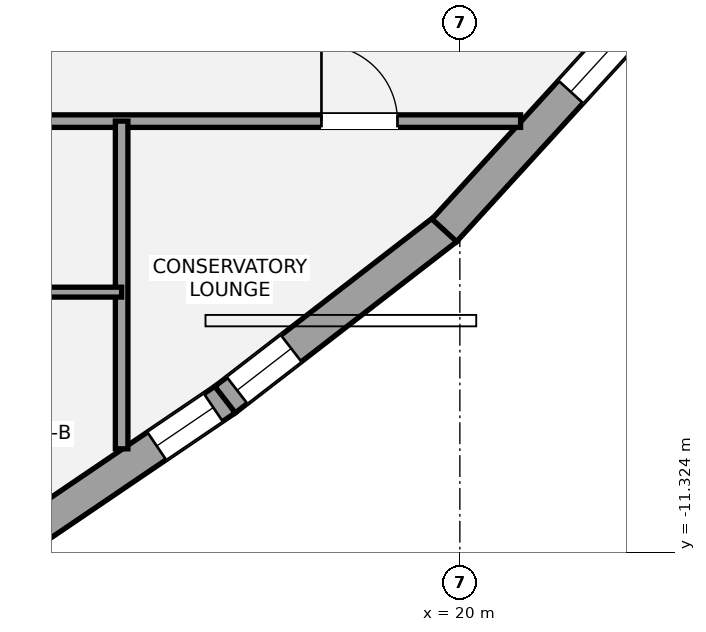
"""IFC4 building model, lengths in metres.
Left out: names, types, materials, properties, quantities, classifications, styles, units other than length and angle.
Written with IfcOpenShell. Run it as: python <this file> out.ifc"""

import sys

from ifc_helpers import new_model, si_unit, direction, frame, frame_2d, origin, place, context, subcontext, project, spatial, rectangle, extrude, element, fill, save


model = new_model("IFC4")
c1 = context("Model", 3, precision=1e-05, world=origin(), true_north=direction((0.0, 1.0)))
c2 = subcontext(c1, "Body", "Model", "MODEL_VIEW")
j1 = project(units=[si_unit("LENGTHUNIT", "METRE"), si_unit("PLANEANGLEUNIT", "RADIAN")], contexts=[c1])
p1 = place(None, origin())
s1 = spatial("IfcSite", under=j1, at=p1, CompositionType="ELEMENT")
p2 = place(p1, origin())
s2 = spatial("IfcBuilding", under=s1, at=p2, CompositionType="ELEMENT")
p3 = place(p2, frame((0.0, 0.0, 210.0)))
s3 = spatial("IfcBuildingStorey", under=s2, at=p3, CompositionType="ELEMENT", Elevation=210.0)
p4 = place(p3, frame((16.922, -9.306, 0.0), z_axis=(0.0, 0.0, 1.0), x_axis=(-0.827589832786, -0.561333295529, 0.0)))
e1 = element("IfcWall", 1, at=p4, inside=s3, PredefinedType="STANDARD", context=c2, shape_type="SweptSolid", body=[
    extrude(rectangle(XDim=3.693, YDim=0.44, at=frame_2d((1.847, 0.0))), origin(), (0.0, 0.0, 1.0), 2.336),
])
p5 = place(p4, frame((0.2, 0.0, 0.42)))
e2 = element("IfcOpeningElement", 2, at=p5, cuts=e1, PredefinedType="OPENING", context=c2, shape_type="SweptSolid", body=[
    extrude(rectangle(XDim=0.9, YDim=1.35, at=frame_2d((0.45, 0.675))), frame((0.0, 0.23, 0.0), z_axis=(0.0, -1.0, 0.0), x_axis=(1.0, 0.0, 0.0)), (0.0, 0.0, 1.0), 0.46),
])
p6 = place(p3, frame((19.823, -7.062, 0.0), z_axis=(0.0, 0.0, 1.0), x_axis=(-0.791016617957, -0.61179466336, 0.0)))
e3 = element("IfcWall", 3, at=p6, inside=s3, PredefinedType="STANDARD", context=c2, shape_type="SweptSolid", body=[
    extrude(rectangle(XDim=3.682, YDim=0.44, at=frame_2d((1.841, 0.0))), origin(), (0.0, 0.0, 1.0), 2.336),
])
p7 = place(p6, frame((2.582, 0.0, 0.42)))
e4 = element("IfcOpeningElement", 4, at=p7, cuts=e3, PredefinedType="OPENING", context=c2, shape_type="SweptSolid", body=[
    extrude(rectangle(XDim=0.9, YDim=1.35, at=frame_2d((0.45, 0.675))), frame((0.0, 0.23, 0.0), z_axis=(0.0, -1.0, 0.0), x_axis=(1.0, 0.0, 0.0)), (0.0, 0.0, 1.0), 0.46),
])
p8 = place(p3, frame((22.201, -4.453, 0.0), z_axis=(0.0, 0.0, 1.0), x_axis=(-0.674353738675, -0.738408447362, 0.0)))
e5 = element("IfcWall", 5, at=p8, inside=s3, PredefinedType="STANDARD", context=c2, shape_type="SweptSolid", body=[
    extrude(rectangle(XDim=3.568, YDim=0.44, at=frame_2d((1.784, 0.0))), origin(), (0.0, 0.0, 1.0), 2.336),
])
p9 = place(p8, frame((0.2, 0.0, 0.42)))
e6 = element("IfcOpeningElement", 6, at=p9, cuts=e5, PredefinedType="OPENING", context=c2, shape_type="SweptSolid", body=[
    extrude(rectangle(XDim=0.9, YDim=1.35, at=frame_2d((0.45, 0.675))), frame((0.0, 0.23, 0.0), z_axis=(0.0, -1.0, 0.0), x_axis=(1.0, 0.0, 0.0)), (0.0, 0.0, 1.0), 0.46),
])
p10 = place(p3, frame((-20.799, -5.65, 0.0), z_axis=(0.0, 0.0, 1.0), x_axis=(1.0, 0.0, 0.0)))
e7 = element("IfcWall", 7, at=p10, inside=s3, PredefinedType="PARTITIONING", context=c2, shape_type="SweptSolid", body=[
    extrude(rectangle(XDim=41.598, YDim=0.165, at=frame_2d((20.799, 0.0))), origin(), (0.0, 0.0, 1.0), 2.357),
])
p11 = place(p10, frame((1.62, 0.0, 0.0)))
e8 = element("IfcOpeningElement", 8, at=p11, cuts=e7, PredefinedType="OPENING", context=c2, shape_type="SweptSolid", body=[
    extrude(rectangle(XDim=1.0, YDim=2.15, at=frame_2d((0.5, 1.075))), frame((0.0, 0.093, 0.0), z_axis=(0.0, -1.0, 0.0), x_axis=(1.0, 0.0, 0.0)), (0.0, 0.0, 1.0), 0.185),
])
p12 = place(p10, frame((38.978, 0.0, 0.0)))
e9 = element("IfcOpeningElement", 9, at=p12, cuts=e7, PredefinedType="OPENING", context=c2, shape_type="SweptSolid", body=[
    extrude(rectangle(XDim=1.0, YDim=2.15, at=frame_2d((0.5, 1.075))), frame((0.0, 0.093, 0.0), z_axis=(0.0, -1.0, 0.0), x_axis=(1.0, 0.0, 0.0)), (0.0, 0.0, 1.0), 0.185),
])
p13 = place(p10, frame((15.109, 0.0, 0.0)))
e10 = element("IfcOpeningElement", 10, at=p13, cuts=e7, PredefinedType="OPENING", context=c2, shape_type="SweptSolid", body=[
    extrude(rectangle(XDim=0.95, YDim=2.15, at=frame_2d((0.475, 1.075))), frame((0.0, 0.093, 0.0), z_axis=(0.0, -1.0, 0.0), x_axis=(1.0, 0.0, 0.0)), (0.0, 0.0, 1.0), 0.185),
])
p14 = place(p10, frame((28.699, 0.0, 0.0)))
e11 = element("IfcOpeningElement", 11, at=p14, cuts=e7, PredefinedType="OPENING", context=c2, shape_type="SweptSolid", body=[
    extrude(rectangle(XDim=0.95, YDim=2.15, at=frame_2d((0.475, 1.075))), frame((0.0, 0.093, 0.0), z_axis=(0.0, -1.0, 0.0), x_axis=(1.0, 0.0, 0.0)), (0.0, 0.0, 1.0), 0.185),
])
p15 = place(p3, frame((15.55, -9.961, 0.0), z_axis=(0.0, 0.0, 1.0), x_axis=(0.0, 1.0, 0.0)))
e12 = element("IfcWall", 12, at=p15, inside=s3, PredefinedType="PARTITIONING", context=c2, shape_type="SweptSolid", body=[
    extrude(rectangle(XDim=4.311, YDim=0.165, at=frame_2d((2.156, 0.0))), origin(), (0.0, 0.0, 1.0), 2.423),
])
p16 = place(p3, frame((12.2, -7.9, 0.0), z_axis=(0.0, 0.0, 1.0), x_axis=(1.0, 0.0, 0.0)))
e13 = element("IfcWall", 13, at=p16, inside=s3, PredefinedType="PARTITIONING", context=c2, shape_type="SweptSolid", body=[
    extrude(rectangle(XDim=3.35, YDim=0.13, at=frame_2d((1.675, 0.0))), origin(), (0.0, 0.0, 1.0), 2.423),
])
p17 = place(p16, frame((0.8, 0.0, 0.0)))
e14 = element("IfcOpeningElement", 14, at=p17, cuts=e13, PredefinedType="OPENING", context=c2, shape_type="SweptSolid", body=[
    extrude(rectangle(XDim=0.85, YDim=2.1, at=frame_2d((0.425, 1.05))), frame((0.0, 0.075, 0.0), z_axis=(0.0, -1.0, 0.0), x_axis=(1.0, 0.0, 0.0)), (0.0, 0.0, 1.0), 0.15),
])
p18 = place(p5, origin())
e15 = element("IfcWindow", 15, at=p18, inside=s3, PartitioningType="SINGLE_PANEL", PredefinedType="WINDOW", context=c2, shape_type="SweptSolid", body=[
    extrude(rectangle(XDim=0.9, YDim=1.35, at=frame_2d((0.45, 0.675))), frame((0.0, -0.01, 0.0), z_axis=(0.0, -1.0, 0.0), x_axis=(1.0, 0.0, 0.0)), (0.0, 0.0, 1.0), 0.06),
])
fill(e2, e15)
p19 = place(p7, origin())
e16 = element("IfcWindow", 16, at=p19, inside=s3, PartitioningType="SINGLE_PANEL", PredefinedType="WINDOW", context=c2, shape_type="SweptSolid", body=[
    extrude(rectangle(XDim=0.9, YDim=1.35, at=frame_2d((0.45, 0.675))), frame((0.0, -0.01, 0.0), z_axis=(0.0, -1.0, 0.0), x_axis=(1.0, 0.0, 0.0)), (0.0, 0.0, 1.0), 0.06),
])
fill(e4, e16)
p20 = place(p9, origin())
e17 = element("IfcWindow", 17, at=p20, inside=s3, PartitioningType="SINGLE_PANEL", PredefinedType="WINDOW", context=c2, shape_type="SweptSolid", body=[
    extrude(rectangle(XDim=0.9, YDim=1.35, at=frame_2d((0.45, 0.675))), frame((0.0, -0.01, 0.0), z_axis=(0.0, -1.0, 0.0), x_axis=(1.0, 0.0, 0.0)), (0.0, 0.0, 1.0), 0.06),
])
fill(e6, e17)
p21 = place(p12, origin())
e18 = element("IfcDoor", 18, at=p21, inside=s3, OperationType="SINGLE_SWING_LEFT", PredefinedType="DOOR", context=c2, shape_type="SweptSolid", body=[
    extrude(rectangle(XDim=1.0, YDim=2.15, at=frame_2d((0.5, 1.075))), frame((0.0, 0.025, 0.0), z_axis=(0.0, -1.0, 0.0), x_axis=(1.0, 0.0, 0.0)), (0.0, 0.0, 1.0), 0.05),
])
fill(e9, e18)
save(model, sys.argv[1])
